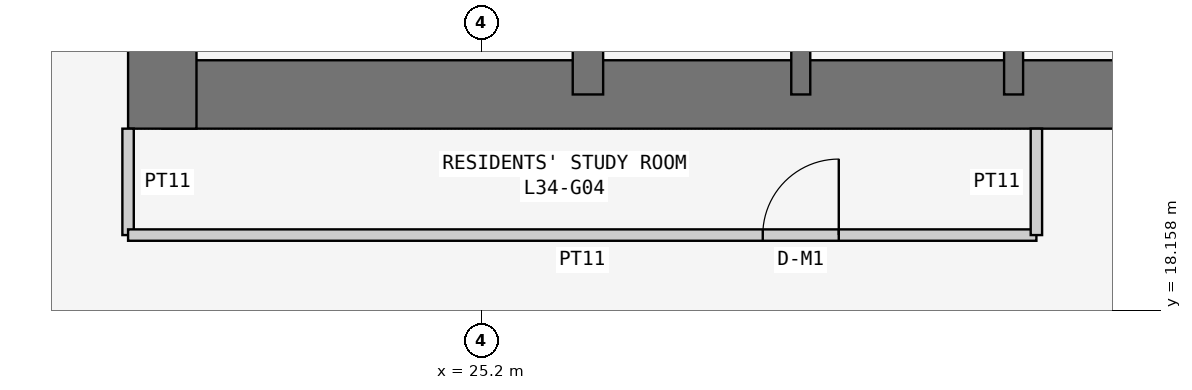
"""IFC4 building model, lengths in metres.
Left out: names, types, materials, properties, quantities, classifications, styles, units other than length and angle.
Written with IfcOpenShell. Run it as: python <this file> out.ifc"""

import sys

from ifc_helpers import new_model, si_unit, direction, frame, frame_2d, origin, place, context, subcontext, project, spatial, rectangle, extrude, element, fill, save


model = new_model("IFC4")
c1 = context("Model", 3, precision=1e-05, world=origin(), true_north=direction((0.0, 1.0)))
c2 = subcontext(c1, "Body", "Model", "MODEL_VIEW")
j1 = project(units=[si_unit("LENGTHUNIT", "METRE"), si_unit("PLANEANGLEUNIT", "RADIAN")], contexts=[c1])
p1 = place(None, origin())
s1 = spatial("IfcSite", under=j1, at=p1, CompositionType="ELEMENT")
p2 = place(p1, origin())
s2 = spatial("IfcBuilding", under=s1, at=p2, CompositionType="ELEMENT")
p3 = place(p2, frame((0.0, 0.0, 134.1)))
s3 = spatial("IfcBuildingStorey", under=s2, at=p3, CompositionType="ELEMENT", Elevation=134.1)
p4 = place(p3, frame((21.0, 21.0, 0.0), z_axis=(0.0, 0.0, 1.0), x_axis=(1.0, 0.0, 0.0)))
e1 = element("IfcWall", 1, at=p4, inside=s3, PredefinedType="SHEAR", context=c2, shape_type="SweptSolid", body=[
    extrude(rectangle(XDim=17.25, YDim=0.9, at=frame_2d((8.625, 0.0))), origin(), (0.0, 0.0, 1.0), 3.6),
])
p5 = place(p3, frame((21.0, 37.8, 0.0), z_axis=(0.0, 0.0, 1.0), x_axis=(0.0, -1.0, 0.0)))
e2 = element("IfcWall", 2, at=p5, inside=s3, PredefinedType="SHEAR", context=c2, shape_type="SweptSolid", body=[
    extrude(rectangle(XDim=17.25, YDim=0.9, at=frame_2d((8.625, 0.0))), origin(), (0.0, 0.0, 1.0), 3.6),
])
p6 = place(p5, frame((5.4, 0.0, 0.0)))
e3 = element("IfcOpeningElement", 3, at=p6, cuts=e2, PredefinedType="OPENING", context=c2, shape_type="SweptSolid", body=[
    extrude(rectangle(XDim=1.2, YDim=2.1, at=frame_2d((0.6, 1.05))), frame((0.0, 0.46, 0.0), z_axis=(0.0, -1.0, 0.0), x_axis=(1.0, 0.0, 0.0)), (0.0, 0.0, 1.0), 0.92),
])
p7 = place(p3, frame((26.6, 21.0, 0.0), z_axis=(0.0, 0.0, 1.0), x_axis=(0.0, 1.0, 0.0)))
e4 = element("IfcWall", 4, at=p7, inside=s3, PredefinedType="SHEAR", context=c2, shape_type="SweptSolid", body=[
    extrude(rectangle(XDim=16.8, YDim=0.4, at=frame_2d((8.4, 0.0))), origin(), (0.0, 0.0, 1.0), 3.6),
])
p8 = place(p7, frame((10.4, 0.0, 0.0)))
e5 = element("IfcOpeningElement", 5, at=p8, cuts=e4, PredefinedType="OPENING", context=c2, shape_type="SweptSolid", body=[
    extrude(rectangle(XDim=1.2, YDim=2.1, at=frame_2d((0.6, 1.05))), frame((0.0, 0.21, 0.0), z_axis=(0.0, -1.0, 0.0), x_axis=(1.0, 0.0, 0.0)), (0.0, 0.0, 1.0), 0.42),
])
for number, where, z_axis, x_axis in (
    (6, (29.4, 21.0, 0.0), (0.0, 0.0, 1.0), (0.0, 1.0, 0.0)),
    (7, (32.2, 21.0, 0.0), (0.0, 0.0, 1.0), (0.0, 1.0, 0.0)),
):
    element("IfcWall", number, at=place(p3, frame(where, z_axis=z_axis, x_axis=x_axis)), inside=s3, PredefinedType="SHEAR", context=c2, shape_type="SweptSolid", body=[
        extrude(rectangle(XDim=3.2, YDim=0.25, at=frame_2d((1.6, 0.0))), origin(), (0.0, 0.0, 1.0), 3.6),
    ])
p9 = place(p3, frame((20.55, 20.55, 0.0), z_axis=(0.0, 0.0, 1.0), x_axis=(0.0, -1.0, 0.0)))
e8 = element("IfcWall", 8, at=p9, inside=s3, PredefinedType="PARTITIONING", context=c2, shape_type="SweptSolid", body=[
    extrude(rectangle(XDim=1.4, YDim=0.15, at=frame_2d((0.7, 0.0))), origin(), (0.0, 0.0, 1.0), 3.45),
])
p10 = place(p3, frame((20.55, 19.15, 0.0), z_axis=(0.0, 0.0, 1.0), x_axis=(1.0, 0.0, 0.0)))
e9 = element("IfcWall", 9, at=p10, inside=s3, PredefinedType="PARTITIONING", context=c2, shape_type="SweptSolid", body=[
    extrude(rectangle(XDim=11.95, YDim=0.15, at=frame_2d((5.975, 0.0))), origin(), (0.0, 0.0, 1.0), 3.45),
])
p11 = place(p10, frame((8.35, 0.0, 0.0)))
e10 = element("IfcOpeningElement", 10, at=p11, cuts=e9, PredefinedType="OPENING", context=c2, shape_type="SweptSolid", body=[
    extrude(rectangle(XDim=1.0, YDim=2.1, at=frame_2d((0.5, 1.05))), frame((0.0, 0.085, 0.0), z_axis=(0.0, -1.0, 0.0), x_axis=(1.0, 0.0, 0.0)), (0.0, 0.0, 1.0), 0.17),
])
p12 = place(p3, frame((32.5, 19.15, 0.0), z_axis=(0.0, 0.0, 1.0), x_axis=(0.0, 1.0, 0.0)))
e11 = element("IfcWall", 11, at=p12, inside=s3, PredefinedType="PARTITIONING", context=c2, shape_type="SweptSolid", body=[
    extrude(rectangle(XDim=1.4, YDim=0.15, at=frame_2d((0.7, 0.0))), origin(), (0.0, 0.0, 1.0), 3.45),
])
p13 = place(p11, origin())
e12 = element("IfcDoor", 12, at=p13, inside=s3, OperationType="SINGLE_SWING_RIGHT", PredefinedType="DOOR", context=c2, shape_type="SweptSolid", body=[
    extrude(rectangle(XDim=1.0, YDim=2.1, at=frame_2d((0.5, 1.05))), frame((0.0, 0.025, 0.0), z_axis=(0.0, -1.0, 0.0), x_axis=(1.0, 0.0, 0.0)), (0.0, 0.0, 1.0), 0.05),
])
fill(e10, e12)
save(model, sys.argv[1])
